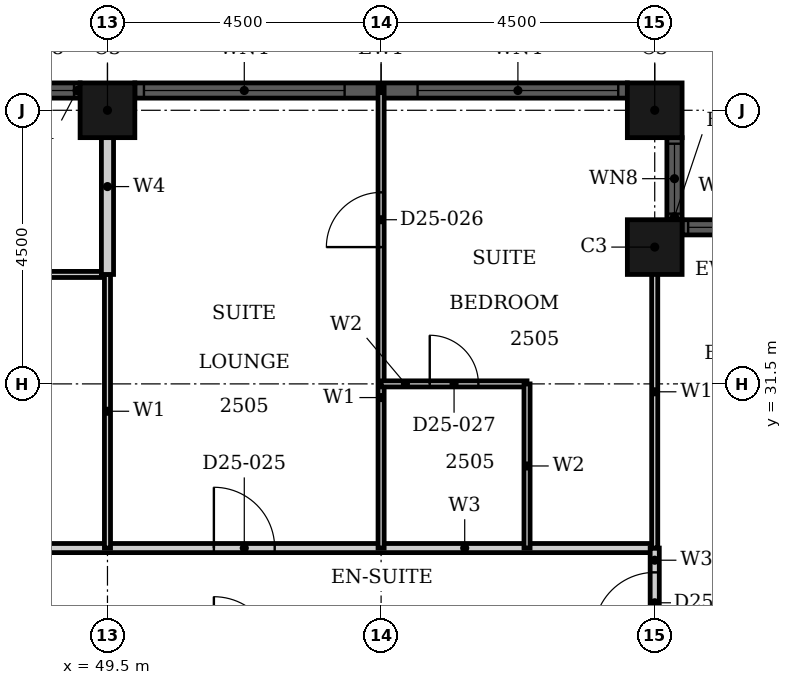
"""IFC4 building model, lengths in metres.
Left out: names, types, materials, properties, quantities, classifications, styles, units other than length and angle.
Written with IfcOpenShell. Run it as: python <this file> out.ifc"""

import sys

from ifc_helpers import new_model, si_unit, direction, frame, frame_2d, origin, origin_2d, place, context, subcontext, project, spatial, rectangle, hollow_rectangle, extrude, element, fill, save


model = new_model("IFC4")
c1 = context("Model", 3, precision=1e-05, world=origin(), true_north=direction((0.0, 1.0)))
c2 = subcontext(c1, "Body", "Model", "MODEL_VIEW")
j1 = project(units=[si_unit("LENGTHUNIT", "METRE"), si_unit("PLANEANGLEUNIT", "RADIAN")], contexts=[c1])
p1 = place(None, origin())
s1 = spatial("IfcSite", under=j1, at=p1, CompositionType="ELEMENT")
p2 = place(p1, origin())
s2 = spatial("IfcBuilding", under=s1, at=p2, CompositionType="ELEMENT")
p3 = place(p2, frame((0.0, 0.0, 104.4)))
s3 = spatial("IfcBuildingStorey", under=s2, at=p3, CompositionType="ELEMENT", Elevation=104.4)
for number, where, z_axis, x_axis in (
    (1, (58.5, 33.75, 0.0), (0.0, 0.0, 1.0), (1.0, 0.0, 0.0)),
    (2, (58.5, 36.0, 0.0), (0.0, 0.0, 1.0), (1.0, 0.0, 0.0)),
    (3, (49.5, 36.0, 0.0), (0.0, 0.0, 1.0), (1.0, 0.0, 0.0)),
):
    element("IfcColumn", number, at=place(p3, frame(where, z_axis=z_axis, x_axis=x_axis)), inside=s3, PredefinedType="COLUMN", context=c2, shape_type="SweptSolid", body=[
        extrude(hollow_rectangle(XDim=0.9, YDim=0.9, WallThickness=0.028, at=origin_2d()), origin(), (0.0, 0.0, 1.0), 3.6),
    ])
p4 = place(p3, frame((60.3, 34.075, 0.0), z_axis=(0.0, 0.0, 1.0), x_axis=(-1.0, 0.0, 0.0)))
e4 = element("IfcWall", 4, at=p4, inside=s3, PredefinedType="SOLIDWALL", context=c2, shape_type="SweptSolid", body=[
    extrude(rectangle(XDim=1.35, YDim=0.25, at=frame_2d((0.675, 0.0))), origin(), (0.0, 0.0, 1.0), 3.6),
])
p5 = place(p4, frame((0.1, 0.0, 0.9)))
e5 = element("IfcOpeningElement", 5, at=p5, cuts=e4, PredefinedType="OPENING", context=c2, shape_type="SweptSolid", body=[
    extrude(rectangle(XDim=1.15, YDim=2.08, at=frame_2d((0.575, 1.04))), frame((0.0, 0.135, 0.0), z_axis=(0.0, -1.0, 0.0), x_axis=(1.0, 0.0, 0.0)), (0.0, 0.0, 1.0), 0.27),
])
p6 = place(p3, frame((58.825, 34.2, 0.0), z_axis=(0.0, 0.0, 1.0), x_axis=(0.0, 1.0, 0.0)))
e6 = element("IfcWall", 6, at=p6, inside=s3, PredefinedType="SOLIDWALL", context=c2, shape_type="SweptSolid", body=[
    extrude(rectangle(XDim=1.35, YDim=0.25, at=frame_2d((0.675, 0.0))), origin(), (0.0, 0.0, 1.0), 3.6),
])
p7 = place(p6, frame((0.1, 0.0, 0.9)))
e7 = element("IfcOpeningElement", 7, at=p7, cuts=e6, PredefinedType="OPENING", context=c2, shape_type="SweptSolid", body=[
    extrude(rectangle(XDim=1.15, YDim=2.08, at=frame_2d((0.575, 1.04))), frame((0.0, 0.135, 0.0), z_axis=(0.0, -1.0, 0.0), x_axis=(1.0, 0.0, 0.0)), (0.0, 0.0, 1.0), 0.27),
])
p8 = place(p3, frame((58.05, 36.325, 0.0), z_axis=(0.0, 0.0, 1.0), x_axis=(-1.0, 0.0, 0.0)))
e8 = element("IfcWall", 8, at=p8, inside=s3, PredefinedType="SOLIDWALL", context=c2, shape_type="SweptSolid", body=[
    extrude(rectangle(XDim=8.1, YDim=0.25, at=frame_2d((4.05, 0.0))), origin(), (0.0, 0.0, 1.0), 3.6),
])
p9 = place(p8, frame((0.15, 0.0, 0.9)))
e9 = element("IfcOpeningElement", 9, at=p9, cuts=e8, PredefinedType="OPENING", context=c2, shape_type="SweptSolid", body=[
    extrude(rectangle(XDim=3.3, YDim=2.08, at=frame_2d((1.65, 1.04))), frame((0.0, 0.135, 0.0), z_axis=(0.0, -1.0, 0.0), x_axis=(1.0, 0.0, 0.0)), (0.0, 0.0, 1.0), 0.27),
])
p10 = place(p8, frame((4.65, 0.0, 0.9)))
e10 = element("IfcOpeningElement", 10, at=p10, cuts=e8, PredefinedType="OPENING", context=c2, shape_type="SweptSolid", body=[
    extrude(rectangle(XDim=3.3, YDim=2.08, at=frame_2d((1.65, 1.04))), frame((0.0, 0.135, 0.0), z_axis=(0.0, -1.0, 0.0), x_axis=(1.0, 0.0, 0.0)), (0.0, 0.0, 1.0), 0.27),
])
p11 = place(p3, frame((49.05, 36.325, 0.0), z_axis=(0.0, 0.0, 1.0), x_axis=(-1.0, 0.0, 0.0)))
e11 = element("IfcWall", 11, at=p11, inside=s3, PredefinedType="SOLIDWALL", context=c2, shape_type="SweptSolid", body=[
    extrude(rectangle(XDim=1.35, YDim=0.25, at=frame_2d((0.675, 0.0))), origin(), (0.0, 0.0, 1.0), 3.6),
])
p12 = place(p11, frame((0.1, 0.0, 0.9)))
e12 = element("IfcOpeningElement", 12, at=p12, cuts=e11, PredefinedType="OPENING", context=c2, shape_type="SweptSolid", body=[
    extrude(rectangle(XDim=1.15, YDim=2.08, at=frame_2d((0.575, 1.04))), frame((0.0, 0.135, 0.0), z_axis=(0.0, -1.0, 0.0), x_axis=(1.0, 0.0, 0.0)), (0.0, 0.0, 1.0), 0.27),
])
p13 = place(p3, frame((46.8, 28.8, 0.0), z_axis=(0.0, 0.0, 1.0), x_axis=(1.0, 0.0, 0.0)))
e13 = element("IfcWall", 13, at=p13, inside=s3, PredefinedType="PARTITIONING", context=c2, shape_type="SweptSolid", body=[
    extrude(rectangle(XDim=11.7, YDim=0.15, at=frame_2d((5.85, 0.0))), origin(), (0.0, 0.0, 1.0), 3.3),
])
p14 = place(p13, frame((4.45, 0.0, 0.0)))
e14 = element("IfcOpeningElement", 14, at=p14, cuts=e13, PredefinedType="OPENING", context=c2, shape_type="SweptSolid", body=[
    extrude(rectangle(XDim=1.0, YDim=2.1, at=frame_2d((0.5, 1.05))), frame((0.0, 0.085, 0.0), z_axis=(0.0, -1.0, 0.0), x_axis=(1.0, 0.0, 0.0)), (0.0, 0.0, 1.0), 0.17),
])
p15 = place(p3, frame((58.5, 27.0, 0.0), z_axis=(0.0, 0.0, 1.0), x_axis=(0.0, 1.0, 0.0)))
e15 = element("IfcWall", 15, at=p15, inside=s3, PredefinedType="PARTITIONING", context=c2, shape_type="SweptSolid", body=[
    extrude(rectangle(XDim=1.8, YDim=0.15, at=frame_2d((0.9, 0.0))), origin(), (0.0, 0.0, 1.0), 3.3),
])
p16 = place(p15, frame((0.4, 0.0, 0.0)))
e16 = element("IfcOpeningElement", 16, at=p16, cuts=e15, PredefinedType="OPENING", context=c2, shape_type="SweptSolid", body=[
    extrude(rectangle(XDim=1.0, YDim=2.1, at=frame_2d((0.5, 1.05))), frame((0.0, 0.085, 0.0), z_axis=(0.0, -1.0, 0.0), x_axis=(1.0, 0.0, 0.0)), (0.0, 0.0, 1.0), 0.17),
])
p17 = place(p3, frame((46.8, 33.3, 0.0), z_axis=(0.0, 0.0, 1.0), x_axis=(1.0, 0.0, 0.0)))
e17 = element("IfcWall", 17, at=p17, inside=s3, PredefinedType="PARTITIONING", context=c2, shape_type="SweptSolid", body=[
    extrude(rectangle(XDim=2.7, YDim=0.1, at=frame_2d((1.35, 0.0))), origin(), (0.0, 0.0, 1.0), 3.3),
])
p18 = place(p3, frame((49.5, 28.8, 0.0), z_axis=(0.0, 0.0, 1.0), x_axis=(0.0, 1.0, 0.0)))
e18 = element("IfcWall", 18, at=p18, inside=s3, PredefinedType="PARTITIONING", context=c2, shape_type="SweptSolid", body=[
    extrude(rectangle(XDim=4.5, YDim=0.1, at=frame_2d((2.25, 0.0))), origin(), (0.0, 0.0, 1.0), 2.38),
])
p19 = place(p3, frame((54.0, 28.8, 0.0), z_axis=(0.0, 0.0, 1.0), x_axis=(0.0, 1.0, 0.0)))
e19 = element("IfcWall", 19, at=p19, inside=s3, PredefinedType="PARTITIONING", context=c2, shape_type="SweptSolid", body=[
    extrude(rectangle(XDim=7.59, YDim=0.1, at=frame_2d((3.795, 0.0))), origin(), (0.0, 0.0, 1.0), 3.3),
])
p20 = place(p19, frame((4.95, 0.0, 0.0)))
e20 = element("IfcOpeningElement", 20, at=p20, cuts=e19, PredefinedType="OPENING", context=c2, shape_type="SweptSolid", body=[
    extrude(rectangle(XDim=0.9, YDim=2.1, at=frame_2d((0.45, 1.05))), frame((0.0, 0.06, 0.0), z_axis=(0.0, -1.0, 0.0), x_axis=(1.0, 0.0, 0.0)), (0.0, 0.0, 1.0), 0.12),
])
p21 = place(p3, frame((58.5, 28.8, 0.0), z_axis=(0.0, 0.0, 1.0), x_axis=(0.0, 1.0, 0.0)))
e21 = element("IfcWall", 21, at=p21, inside=s3, PredefinedType="PARTITIONING", context=c2, shape_type="SweptSolid", body=[
    extrude(rectangle(XDim=5.14, YDim=0.1, at=frame_2d((2.57, 0.0))), origin(), (0.0, 0.0, 1.0), 3.3),
])
p22 = place(p3, frame((49.5, 33.3, 0.0), z_axis=(0.0, 0.0, 1.0), x_axis=(0.0, 1.0, 0.0)))
e22 = element("IfcWall", 22, at=p22, inside=s3, PredefinedType="PARTITIONING", context=c2, shape_type="SweptSolid", body=[
    extrude(rectangle(XDim=2.89, YDim=0.2, at=frame_2d((1.445, 0.0))), origin(), (0.0, 0.0, 1.0), 2.38),
])
p23 = place(p3, frame((54.0, 31.5, 0.0), z_axis=(0.0, 0.0, 1.0), x_axis=(1.0, 0.0, 0.0)))
e23 = element("IfcWall", 23, at=p23, inside=s3, PredefinedType="PARTITIONING", context=c2, shape_type="SweptSolid", body=[
    extrude(rectangle(XDim=2.4, YDim=0.1, at=frame_2d((1.2, 0.0))), origin(), (0.0, 0.0, 1.0), 2.58),
])
p24 = place(p23, frame((0.8, 0.0, 0.0)))
e24 = element("IfcOpeningElement", 24, at=p24, cuts=e23, PredefinedType="OPENING", context=c2, shape_type="SweptSolid", body=[
    extrude(rectangle(XDim=0.8, YDim=2.1, at=frame_2d((0.4, 1.05))), frame((0.0, 0.06, 0.0), z_axis=(0.0, -1.0, 0.0), x_axis=(1.0, 0.0, 0.0)), (0.0, 0.0, 1.0), 0.12),
])
p25 = place(p3, frame((56.4, 28.8, 0.0), z_axis=(0.0, 0.0, 1.0), x_axis=(0.0, 1.0, 0.0)))
e25 = element("IfcWall", 25, at=p25, inside=s3, PredefinedType="PARTITIONING", context=c2, shape_type="SweptSolid", body=[
    extrude(rectangle(XDim=2.7, YDim=0.1, at=frame_2d((1.35, 0.0))), origin(), (0.0, 0.0, 1.0), 3.3),
])
p26 = place(p5, origin())
e26 = element("IfcWindow", 26, at=p26, inside=s3, PartitioningType="SINGLE_PANEL", PredefinedType="WINDOW", context=c2, shape_type="SweptSolid", body=[
    extrude(rectangle(XDim=1.15, YDim=2.08, at=frame_2d((0.575, 1.04))), frame((0.0, 0.03, 0.0), z_axis=(0.0, -1.0, 0.0), x_axis=(1.0, 0.0, 0.0)), (0.0, 0.0, 1.0), 0.06),
])
fill(e5, e26)
p27 = place(p7, origin())
e27 = element("IfcWindow", 27, at=p27, inside=s3, PartitioningType="SINGLE_PANEL", PredefinedType="WINDOW", context=c2, shape_type="SweptSolid", body=[
    extrude(rectangle(XDim=1.15, YDim=2.08, at=frame_2d((0.575, 1.04))), frame((0.0, 0.03, 0.0), z_axis=(0.0, -1.0, 0.0), x_axis=(1.0, 0.0, 0.0)), (0.0, 0.0, 1.0), 0.06),
])
fill(e7, e27)
p28 = place(p9, origin())
e28 = element("IfcWindow", 28, at=p28, inside=s3, PartitioningType="SINGLE_PANEL", PredefinedType="WINDOW", context=c2, shape_type="SweptSolid", body=[
    extrude(rectangle(XDim=3.3, YDim=2.08, at=frame_2d((1.65, 1.04))), frame((0.0, 0.03, 0.0), z_axis=(0.0, -1.0, 0.0), x_axis=(1.0, 0.0, 0.0)), (0.0, 0.0, 1.0), 0.06),
])
fill(e9, e28)
p29 = place(p10, origin())
e29 = element("IfcWindow", 29, at=p29, inside=s3, PartitioningType="SINGLE_PANEL", PredefinedType="WINDOW", context=c2, shape_type="SweptSolid", body=[
    extrude(rectangle(XDim=3.3, YDim=2.08, at=frame_2d((1.65, 1.04))), frame((0.0, 0.03, 0.0), z_axis=(0.0, -1.0, 0.0), x_axis=(1.0, 0.0, 0.0)), (0.0, 0.0, 1.0), 0.06),
])
fill(e10, e29)
p30 = place(p12, origin())
e30 = element("IfcWindow", 30, at=p30, inside=s3, PartitioningType="SINGLE_PANEL", PredefinedType="WINDOW", context=c2, shape_type="SweptSolid", body=[
    extrude(rectangle(XDim=1.15, YDim=2.08, at=frame_2d((0.575, 1.04))), frame((0.0, 0.03, 0.0), z_axis=(0.0, -1.0, 0.0), x_axis=(1.0, 0.0, 0.0)), (0.0, 0.0, 1.0), 0.06),
])
fill(e12, e30)
p31 = place(p14, origin())
e31 = element("IfcDoor", 31, at=p31, inside=s3, OperationType="SINGLE_SWING_RIGHT", PredefinedType="DOOR", context=c2, shape_type="SweptSolid", body=[
    extrude(rectangle(XDim=1.0, YDim=2.1, at=frame_2d((0.5, 1.05))), frame((0.0, 0.025, 0.0), z_axis=(0.0, -1.0, 0.0), x_axis=(1.0, 0.0, 0.0)), (0.0, 0.0, 1.0), 0.05),
])
fill(e14, e31)
p32 = place(p20, origin())
e32 = element("IfcDoor", 32, at=p32, inside=s3, OperationType="SINGLE_SWING_RIGHT", PredefinedType="DOOR", context=c2, shape_type="SweptSolid", body=[
    extrude(rectangle(XDim=0.9, YDim=2.1, at=frame_2d((0.45, 1.05))), frame((0.0, 0.025, 0.0), z_axis=(0.0, -1.0, 0.0), x_axis=(1.0, 0.0, 0.0)), (0.0, 0.0, 1.0), 0.05),
])
fill(e20, e32)
p33 = place(p24, origin())
e33 = element("IfcDoor", 33, at=p33, inside=s3, OperationType="SINGLE_SWING_RIGHT", PredefinedType="DOOR", context=c2, shape_type="SweptSolid", body=[
    extrude(rectangle(XDim=0.8, YDim=2.1, at=frame_2d((0.4, 1.05))), frame((0.0, 0.025, 0.0), z_axis=(0.0, -1.0, 0.0), x_axis=(1.0, 0.0, 0.0)), (0.0, 0.0, 1.0), 0.05),
])
fill(e24, e33)
p34 = place(p16, origin())
e34 = element("IfcDoor", 34, at=p34, inside=s3, OperationType="SINGLE_SWING_RIGHT", PredefinedType="DOOR", context=c2, shape_type="SweptSolid", body=[
    extrude(rectangle(XDim=1.0, YDim=2.1, at=frame_2d((0.5, 1.05))), frame((0.0, 0.025, 0.0), z_axis=(0.0, -1.0, 0.0), x_axis=(1.0, 0.0, 0.0)), (0.0, 0.0, 1.0), 0.05),
])
fill(e16, e34)
save(model, sys.argv[1])
